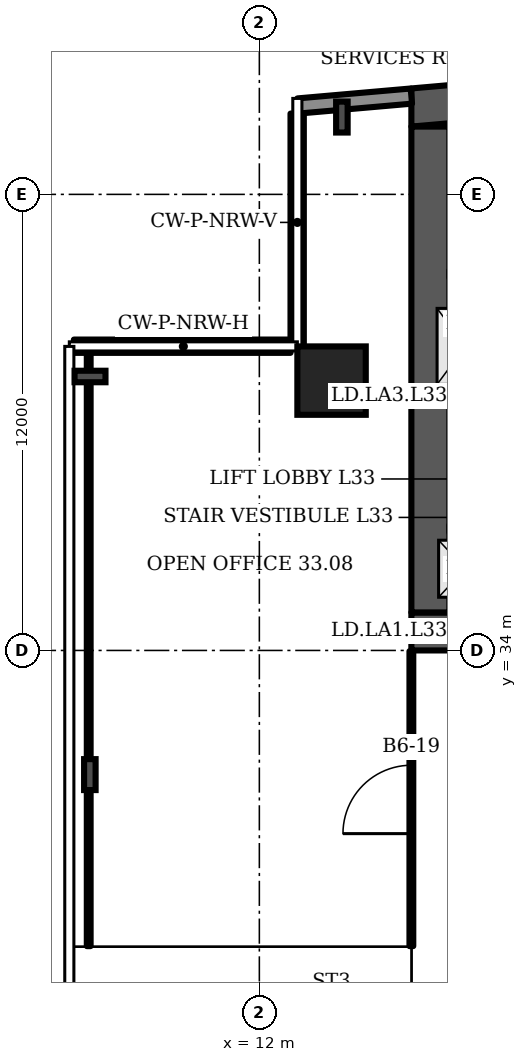
"""IFC4 building model, lengths in metres.
Left out: names, types, materials, properties, quantities, classifications, styles, units other than length and angle.
Written with IfcOpenShell. Run it as: python <this file> out.ifc"""

import sys

from ifc_helpers import new_model, si_unit, direction, frame, frame_2d, origin, origin_2d, place, context, subcontext, project, spatial, polyline, rectangle, i_section, outline, extrude, element, fill, save


model = new_model("IFC4")
c1 = context("Model", 3, precision=1e-05, world=origin(), true_north=direction((0.0, 1.0)))
c2 = subcontext(c1, "Body", "Model", "MODEL_VIEW")
j1 = project(units=[si_unit("LENGTHUNIT", "METRE"), si_unit("PLANEANGLEUNIT", "RADIAN")], contexts=[c1])
p1 = place(None, origin())
s1 = spatial("IfcSite", under=j1, at=p1, CompositionType="ELEMENT")
p2 = place(p1, origin())
s2 = spatial("IfcBuilding", under=s1, at=p2, CompositionType="ELEMENT")
p3 = place(p2, frame((0.0, 0.0, 139.9)))
s3 = spatial("IfcBuildingStorey", under=s2, at=p3, CompositionType="ELEMENT", Elevation=139.9)
p4 = place(p3, origin())
e1 = element("IfcWall", 1, at=p4, inside=s3, PredefinedType="SHEAR", context=c2, shape_type="SweptSolid", body=[
    extrude(outline(polyline([(16.0, 47.784), (40.5, 49.927), (65.0, 47.784), (65.0, 48.787), (40.5, 50.931), (16.0, 48.787), (16.0, 47.784)])), origin(), (0.0, 0.0, 1.0), 3.6),
])
p5 = place(p3, frame((16.0, 34.5, 0.0), z_axis=(0.0, 0.0, 1.0), x_axis=(1.0, 0.0, 0.0)))
e2 = element("IfcWall", 2, at=p5, inside=s3, PredefinedType="SHEAR", context=c2, shape_type="SweptSolid", body=[
    extrude(rectangle(XDim=49.0, YDim=1.0, at=frame_2d((24.5, 0.0))), origin(), (0.0, 0.0, 1.0), 3.6),
])
p6 = place(p5, frame((1.2, 0.0, 0.0)))
e3 = element("IfcOpeningElement", 3, at=p6, cuts=e2, PredefinedType="OPENING", context=c2, shape_type="SweptSolid", body=[
    extrude(rectangle(XDim=1.1, YDim=2.1, at=frame_2d((0.55, 1.05))), frame((0.0, 0.51, 0.0), z_axis=(0.0, -1.0, 0.0), x_axis=(1.0, 0.0, 0.0)), (0.0, 0.0, 1.0), 1.02),
])
p7 = place(p5, frame((5.083, 0.0, 0.0)))
e4 = element("IfcOpeningElement", 4, at=p7, cuts=e2, PredefinedType="OPENING", context=c2, shape_type="SweptSolid", body=[
    extrude(rectangle(XDim=1.1, YDim=2.1, at=frame_2d((0.55, 1.05))), frame((0.0, 0.51, 0.0), z_axis=(0.0, -1.0, 0.0), x_axis=(1.0, 0.0, 0.0)), (0.0, 0.0, 1.0), 1.02),
])
p8 = place(p5, frame((2.933, 0.0, 0.0)))
e5 = element("IfcOpeningElement", 5, at=p8, cuts=e2, PredefinedType="OPENING", context=c2, shape_type="SweptSolid", body=[
    extrude(rectangle(XDim=1.4, YDim=2.1, at=frame_2d((0.7, 1.05))), frame((0.0, 0.51, 0.0), z_axis=(0.0, -1.0, 0.0), x_axis=(1.0, 0.0, 0.0)), (0.0, 0.0, 1.0), 1.02),
])
p9 = place(p5, frame((7.65, 0.0, 0.0)))
e6 = element("IfcOpeningElement", 6, at=p9, cuts=e2, PredefinedType="OPENING", context=c2, shape_type="SweptSolid", body=[
    extrude(rectangle(XDim=1.2, YDim=2.1, at=frame_2d((0.6, 1.05))), frame((0.0, 0.51, 0.0), z_axis=(0.0, -1.0, 0.0), x_axis=(1.0, 0.0, 0.0)), (0.0, 0.0, 1.0), 1.02),
])
p10 = place(p5, frame((14.817, 0.0, 0.0)))
e7 = element("IfcOpeningElement", 7, at=p10, cuts=e2, PredefinedType="OPENING", context=c2, shape_type="SweptSolid", body=[
    extrude(rectangle(XDim=1.1, YDim=2.1, at=frame_2d((0.55, 1.05))), frame((0.0, 0.51, 0.0), z_axis=(0.0, -1.0, 0.0), x_axis=(1.0, 0.0, 0.0)), (0.0, 0.0, 1.0), 1.02),
])
p11 = place(p5, frame((19.083, 0.0, 0.0)))
e8 = element("IfcOpeningElement", 8, at=p11, cuts=e2, PredefinedType="OPENING", context=c2, shape_type="SweptSolid", body=[
    extrude(rectangle(XDim=1.1, YDim=2.1, at=frame_2d((0.55, 1.05))), frame((0.0, 0.51, 0.0), z_axis=(0.0, -1.0, 0.0), x_axis=(1.0, 0.0, 0.0)), (0.0, 0.0, 1.0), 1.02),
])
p12 = place(p5, frame((16.8, 0.0, 0.0)))
e9 = element("IfcOpeningElement", 9, at=p12, cuts=e2, PredefinedType="OPENING", context=c2, shape_type="SweptSolid", body=[
    extrude(rectangle(XDim=1.4, YDim=2.1, at=frame_2d((0.7, 1.05))), frame((0.0, 0.51, 0.0), z_axis=(0.0, -1.0, 0.0), x_axis=(1.0, 0.0, 0.0)), (0.0, 0.0, 1.0), 1.02),
])
p13 = place(p5, frame((21.817, 0.0, 0.0)))
e10 = element("IfcOpeningElement", 10, at=p13, cuts=e2, PredefinedType="OPENING", context=c2, shape_type="SweptSolid", body=[
    extrude(rectangle(XDim=1.1, YDim=2.1, at=frame_2d((0.55, 1.05))), frame((0.0, 0.51, 0.0), z_axis=(0.0, -1.0, 0.0), x_axis=(1.0, 0.0, 0.0)), (0.0, 0.0, 1.0), 1.02),
])
p14 = place(p5, frame((26.083, 0.0, 0.0)))
e11 = element("IfcOpeningElement", 11, at=p14, cuts=e2, PredefinedType="OPENING", context=c2, shape_type="SweptSolid", body=[
    extrude(rectangle(XDim=1.1, YDim=2.1, at=frame_2d((0.55, 1.05))), frame((0.0, 0.51, 0.0), z_axis=(0.0, -1.0, 0.0), x_axis=(1.0, 0.0, 0.0)), (0.0, 0.0, 1.0), 1.02),
])
p15 = place(p5, frame((33.15, 0.0, 0.0)))
e12 = element("IfcOpeningElement", 12, at=p15, cuts=e2, PredefinedType="OPENING", context=c2, shape_type="SweptSolid", body=[
    extrude(rectangle(XDim=1.2, YDim=2.1, at=frame_2d((0.6, 1.05))), frame((0.0, 0.51, 0.0), z_axis=(0.0, -1.0, 0.0), x_axis=(1.0, 0.0, 0.0)), (0.0, 0.0, 1.0), 1.02),
])
p16 = place(p5, frame((37.8, 0.0, 0.0)))
e13 = element("IfcOpeningElement", 13, at=p16, cuts=e2, PredefinedType="OPENING", context=c2, shape_type="SweptSolid", body=[
    extrude(rectangle(XDim=1.4, YDim=2.1, at=frame_2d((0.7, 1.05))), frame((0.0, 0.51, 0.0), z_axis=(0.0, -1.0, 0.0), x_axis=(1.0, 0.0, 0.0)), (0.0, 0.0, 1.0), 1.02),
])
p17 = place(p5, frame((42.817, 0.0, 0.0)))
e14 = element("IfcOpeningElement", 14, at=p17, cuts=e2, PredefinedType="OPENING", context=c2, shape_type="SweptSolid", body=[
    extrude(rectangle(XDim=1.1, YDim=2.1, at=frame_2d((0.55, 1.05))), frame((0.0, 0.51, 0.0), z_axis=(0.0, -1.0, 0.0), x_axis=(1.0, 0.0, 0.0)), (0.0, 0.0, 1.0), 1.02),
])
p18 = place(p5, frame((46.7, 0.0, 0.0)))
e15 = element("IfcOpeningElement", 15, at=p18, cuts=e2, PredefinedType="OPENING", context=c2, shape_type="SweptSolid", body=[
    extrude(rectangle(XDim=1.1, YDim=2.1, at=frame_2d((0.55, 1.05))), frame((0.0, 0.51, 0.0), z_axis=(0.0, -1.0, 0.0), x_axis=(1.0, 0.0, 0.0)), (0.0, 0.0, 1.0), 1.02),
])
p19 = place(p5, frame((44.667, 0.0, 0.0)))
e16 = element("IfcOpeningElement", 16, at=p19, cuts=e2, PredefinedType="OPENING", context=c2, shape_type="SweptSolid", body=[
    extrude(rectangle(XDim=1.4, YDim=2.1, at=frame_2d((0.7, 1.05))), frame((0.0, 0.51, 0.0), z_axis=(0.0, -1.0, 0.0), x_axis=(1.0, 0.0, 0.0)), (0.0, 0.0, 1.0), 1.02),
])
p20 = place(p3, frame((16.5, 35.0, 0.0), z_axis=(0.0, 0.0, 1.0), x_axis=(0.0, 1.0, 0.0)))
e17 = element("IfcWall", 17, at=p20, inside=s3, PredefinedType="SHEAR", context=c2, shape_type="SweptSolid", body=[
    extrude(rectangle(XDim=12.784, YDim=1.0, at=frame_2d((6.392, 0.0))), origin(), (0.0, 0.0, 1.0), 3.6),
])
p21 = place(p3, frame((13.9, 41.1, 0.0), z_axis=(0.0, 0.0, 1.0), x_axis=(1.0, 0.0, 0.0)))
e18 = element("IfcColumn", 18, at=p21, inside=s3, PredefinedType="COLUMN", context=c2, shape_type="SweptSolid", body=[
    extrude(rectangle(XDim=1.8, YDim=1.8, at=origin_2d()), origin(), (0.0, 0.0, 1.0), 3.6),
])
for number, where, z_axis, x_axis in (
    (19, (14.172, 48.034, 0.0), (0.0, 0.0, 1.0), (-1.0, 0.0, 0.0)),
    (20, (7.544, 41.208, 0.0), (0.0, 0.0, 1.0), (0.0, 1.0, 0.0)),
    (21, (7.54, 30.733, 0.0), (0.0, 0.0, 1.0), (-1.0, 0.0, 0.0)),
):
    element("IfcColumn", number, at=place(p3, frame(where, z_axis=z_axis, x_axis=x_axis)), inside=s3, PredefinedType="COLUMN", context=c2, shape_type="SweptSolid", body=[
        extrude(i_section(OverallWidth=0.303, OverallDepth=0.814, WebThickness=0.021, FlangeThickness=0.04, FilletRadius=0.03, at=origin_2d()), origin(), (0.0, 0.0, 1.0), 3.6),
    ])
p22 = place(p3, frame((16.0, 48.587, 0.0), z_axis=(0.0, 0.0, 1.0), x_axis=(-0.996194, -0.087168, 0.0)))
e22 = element("IfcWall", 22, at=p22, inside=s3, PredefinedType="SOLIDWALL", context=c2, shape_type="SweptSolid", body=[
    extrude(rectangle(XDim=2.994, YDim=0.4, at=frame_2d((1.497, 0.0))), origin(), (0.0, 0.0, 1.0), 3.2),
])
p23 = place(p3, frame((12.995, 48.126, 0.0), z_axis=(0.0, 0.0, 1.0), x_axis=(0.0, -1.0, 0.0)))
e23 = element("IfcWall", 23, at=p23, inside=s3, PredefinedType="SOLIDWALL", context=c2, shape_type="SweptSolid", body=[
    extrude(rectangle(XDim=6.126, YDim=0.35, at=frame_2d((3.063, 0.0))), origin(), (0.0, 0.0, 1.0), 1.0),
])
p24 = place(p3, frame((12.82, 42.005, 0.0), z_axis=(0.0, 0.0, 1.0), x_axis=(-1.0, 0.0, 0.0)))
e24 = element("IfcWall", 24, at=p24, inside=s3, PredefinedType="SOLIDWALL", context=c2, shape_type="SweptSolid", body=[
    extrude(rectangle(XDim=5.7, YDim=0.35, at=frame_2d((2.85, 0.0))), origin(), (0.0, 0.0, 1.0), 1.0),
])
p25 = place(p3, frame((7.51, 26.22, 0.0), z_axis=(0.0, 0.0, 1.0), x_axis=(0.0, 1.0, 0.0)))
e25 = element("IfcWall", 25, at=p25, inside=s3, PredefinedType="PARTITIONING", context=c2, shape_type="SweptSolid", body=[
    extrude(rectangle(XDim=15.76, YDim=0.1, at=frame_2d((7.88, 0.0))), origin(), (0.0, 0.0, 1.0), 2.58),
])
p26 = place(p3, frame((16.0, 26.22, 0.0), z_axis=(0.0, 0.0, 1.0), x_axis=(0.0, 1.0, 0.0)))
e26 = element("IfcWall", 26, at=p26, inside=s3, PredefinedType="PARTITIONING", context=c2, shape_type="SweptSolid", body=[
    extrude(rectangle(XDim=7.76, YDim=0.1, at=frame_2d((3.88, 0.0))), origin(), (0.0, 0.0, 1.0), 3.2),
])
p27 = place(p26, frame((2.96, 0.0, 0.0)))
e27 = element("IfcOpeningElement", 27, at=p27, cuts=e26, PredefinedType="OPENING", context=c2, shape_type="SweptSolid", body=[
    extrude(rectangle(XDim=1.8, YDim=2.1, at=frame_2d((0.9, 1.05))), frame((0.0, 0.06, 0.0), z_axis=(0.0, -1.0, 0.0), x_axis=(1.0, 0.0, 0.0)), (0.0, 0.0, 1.0), 0.12),
])
p28 = place(p27, origin())
e28 = element("IfcDoor", 28, at=p28, inside=s3, OperationType="DOUBLE_DOOR_SINGLE_SWING", PredefinedType="DOOR", context=c2, shape_type="SweptSolid", body=[
    extrude(rectangle(XDim=1.8, YDim=2.1, at=frame_2d((0.9, 1.05))), frame((0.0, 0.025, 0.0), z_axis=(0.0, -1.0, 0.0), x_axis=(1.0, 0.0, 0.0)), (0.0, 0.0, 1.0), 0.05),
])
fill(e27, e28)
save(model, sys.argv[1])
